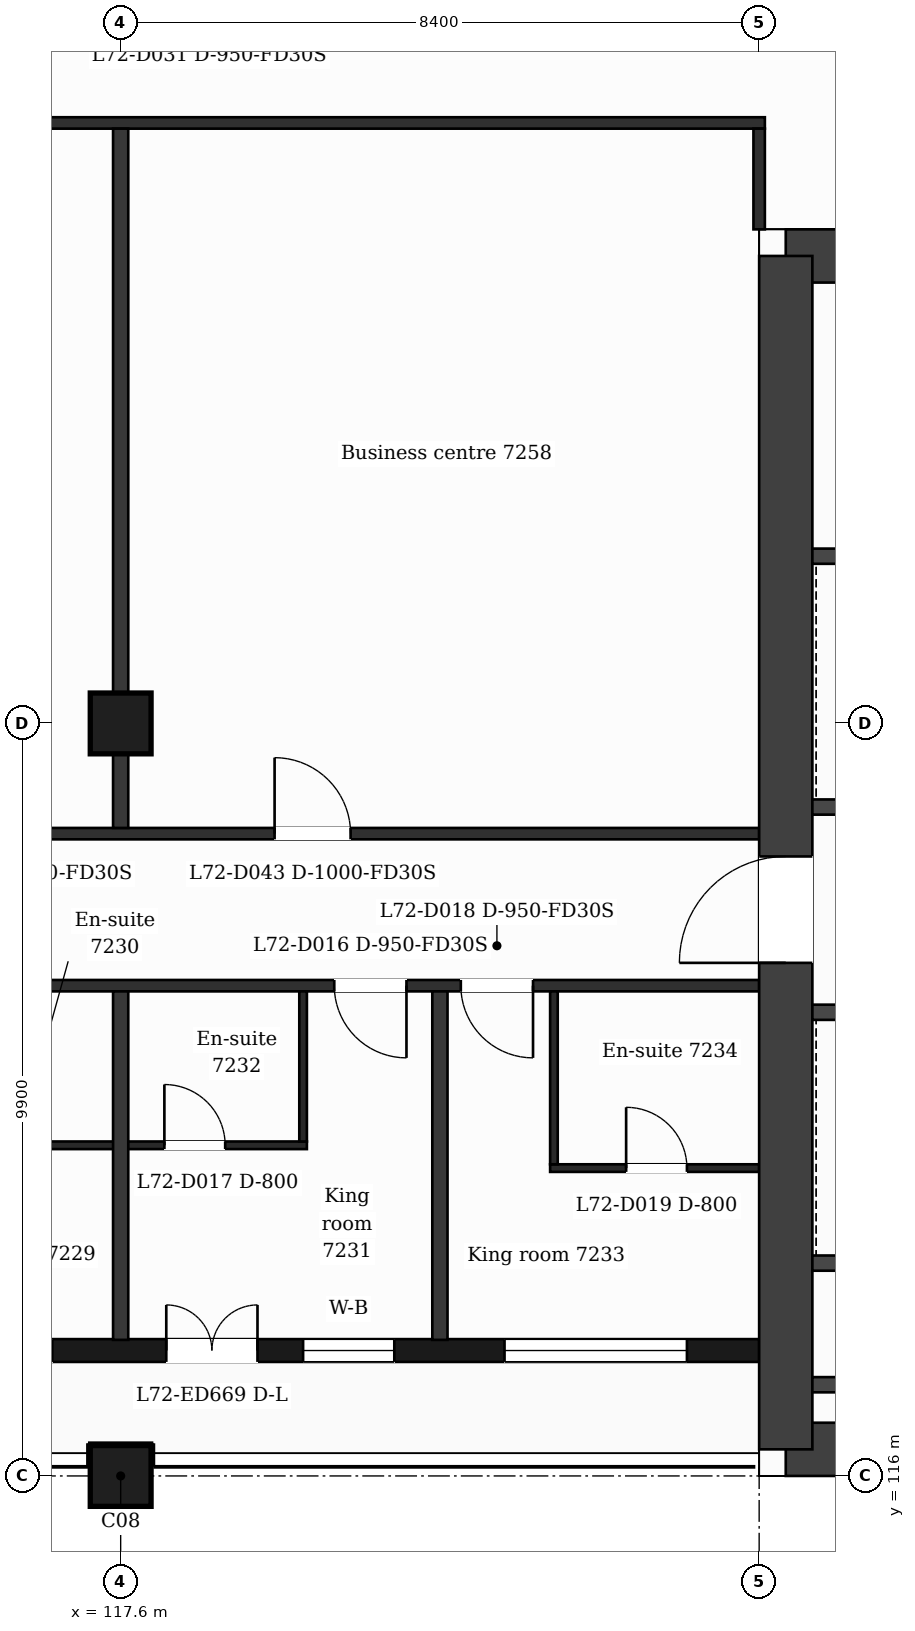
"""IFC4 building model, lengths in metres.
Left out: names, types, materials, properties, quantities, classifications, styles, units other than length and angle.
Written with IfcOpenShell. Run it as: python <this file> out.ifc"""

import sys

from ifc_helpers import new_model, si_unit, direction, frame, frame_2d, origin, origin_2d, place, context, subcontext, project, spatial, rectangle, extrude, element, fill, save


model = new_model("IFC4")
c1 = context("Model", 3, precision=1e-05, world=origin(), true_north=direction((0.0, 1.0)))
c2 = subcontext(c1, "Body", "Model", "MODEL_VIEW")
j1 = project(units=[si_unit("LENGTHUNIT", "METRE"), si_unit("PLANEANGLEUNIT", "RADIAN")], contexts=[c1])
p1 = place(None, origin())
s1 = spatial("IfcSite", under=j1, at=p1, CompositionType="ELEMENT")
p2 = place(p1, origin())
s2 = spatial("IfcBuilding", under=s1, at=p2, CompositionType="ELEMENT")
p3 = place(p2, frame((0.0, 0.0, 296.0)))
s3 = spatial("IfcBuildingStorey", under=s2, at=p3, CompositionType="ELEMENT", Elevation=296.0)
p4 = place(p3, frame((126.35, 132.05, 0.0), z_axis=(0.0, 0.0, 1.0), x_axis=(1.0, 0.0, 0.0)))
e1 = element("IfcWall", 1, at=p4, inside=s3, PredefinedType="SHEAR", context=c2, shape_type="SweptSolid", body=[
    extrude(rectangle(XDim=11.513, YDim=0.7, at=frame_2d((5.757, 0.0))), origin(), (0.0, 0.0, 1.0), 3.7),
])
p5 = place(p4, frame((3.386, 0.0, 0.0)))
e2 = element("IfcOpeningElement", 2, at=p5, cuts=e1, PredefinedType="OPENING", context=c2, shape_type="SweptSolid", body=[
    extrude(rectangle(XDim=1.2, YDim=2.1, at=frame_2d((0.6, 1.05))), frame((0.0, 0.36, 0.0), z_axis=(0.0, -1.0, 0.0), x_axis=(1.0, 0.0, 0.0)), (0.0, 0.0, 1.0), 0.72),
])
p6 = place(p3, frame((139.977, 116.35, 0.0), z_axis=(0.0, 0.0, 1.0), x_axis=(-1.0, 0.0, 0.0)))
e3 = element("IfcWall", 3, at=p6, inside=s3, PredefinedType="SHEAR", context=c2, shape_type="SweptSolid", body=[
    extrude(rectangle(XDim=13.626, YDim=0.7, at=frame_2d((6.813, 0.0))), origin(), (0.0, 0.0, 1.0), 3.7),
])
p7 = place(p3, frame((126.35, 116.35, 0.0), z_axis=(0.0, 0.0, 1.0), x_axis=(0.0, 1.0, 0.0)))
e4 = element("IfcWall", 4, at=p7, inside=s3, PredefinedType="SHEAR", context=c2, shape_type="SweptSolid", body=[
    extrude(rectangle(XDim=15.7, YDim=0.7, at=frame_2d((7.85, 0.0))), origin(), (0.0, 0.0, 1.0), 3.7),
])
p8 = place(p7, frame((6.4, 0.0, 0.0)))
e5 = element("IfcOpeningElement", 5, at=p8, cuts=e4, PredefinedType="OPENING", context=c2, shape_type="SweptSolid", body=[
    extrude(rectangle(XDim=1.4, YDim=2.1, at=frame_2d((0.7, 1.05))), frame((0.0, 0.36, 0.0), z_axis=(0.0, -1.0, 0.0), x_axis=(1.0, 0.0, 0.0)), (0.0, 0.0, 1.0), 0.72),
])
for number, where, z_axis, x_axis in (
    (6, (117.6, 116.0, 0.0), (0.0, 0.0, 1.0), (1.0, 0.0, 0.0)),
    (7, (117.6, 125.9, 0.0), (0.0, 0.0, 1.0), (1.0, 0.0, 0.0)),
):
    element("IfcColumn", number, at=place(p3, frame(where, z_axis=z_axis, x_axis=x_axis)), inside=s3, PredefinedType="COLUMN", context=c2, shape_type="SweptSolid", body=[
        extrude(rectangle(XDim=0.8, YDim=0.8, at=origin_2d()), origin(), (0.0, 0.0, 1.0), 3.7),
    ])
p9 = place(p3, frame((100.8, 117.65, 0.0), z_axis=(0.0, 0.0, 1.0), x_axis=(1.0, 0.0, 0.0)))
e8 = element("IfcWall", 8, at=p9, inside=s3, PredefinedType="SOLIDWALL", context=c2, shape_type="SweptSolid", body=[
    extrude(rectangle(XDim=25.2, YDim=0.3, at=frame_2d((12.6, 0.0))), origin(), (0.0, 0.0, 1.0), 3.38),
])
p10 = place(p9, frame((1.55, 0.0, 0.9)))
e9 = element("IfcOpeningElement", 9, at=p10, cuts=e8, PredefinedType="OPENING", context=c2, shape_type="SweptSolid", body=[
    extrude(rectangle(XDim=1.2, YDim=2.1, at=frame_2d((0.6, 1.05))), frame((0.0, 0.16, 0.0), z_axis=(0.0, -1.0, 0.0), x_axis=(1.0, 0.0, 0.0)), (0.0, 0.0, 1.0), 0.32),
])
p11 = place(p9, frame((5.7, 0.0, 0.9)))
e10 = element("IfcOpeningElement", 10, at=p11, cuts=e8, PredefinedType="OPENING", context=c2, shape_type="SweptSolid", body=[
    extrude(rectangle(XDim=1.2, YDim=2.1, at=frame_2d((0.6, 1.05))), frame((0.0, 0.16, 0.0), z_axis=(0.0, -1.0, 0.0), x_axis=(1.0, 0.0, 0.0)), (0.0, 0.0, 1.0), 0.32),
])
p12 = place(p9, frame((9.0, 0.0, 0.0)))
e11 = element("IfcOpeningElement", 11, at=p12, cuts=e8, PredefinedType="OPENING", context=c2, shape_type="SweptSolid", body=[
    extrude(rectangle(XDim=1.2, YDim=2.4, at=frame_2d((0.6, 1.2))), frame((0.0, 0.16, 0.0), z_axis=(0.0, -1.0, 0.0), x_axis=(1.0, 0.0, 0.0)), (0.0, 0.0, 1.0), 0.32),
])
p13 = place(p9, frame((10.8, 0.0, 0.9)))
e12 = element("IfcOpeningElement", 12, at=p13, cuts=e8, PredefinedType="OPENING", context=c2, shape_type="SweptSolid", body=[
    extrude(rectangle(XDim=1.2, YDim=2.1, at=frame_2d((0.6, 1.05))), frame((0.0, 0.16, 0.0), z_axis=(0.0, -1.0, 0.0), x_axis=(1.0, 0.0, 0.0)), (0.0, 0.0, 1.0), 0.32),
])
p14 = place(p9, frame((13.5, 0.0, 0.9)))
e13 = element("IfcOpeningElement", 13, at=p14, cuts=e8, PredefinedType="OPENING", context=c2, shape_type="SweptSolid", body=[
    extrude(rectangle(XDim=2.4, YDim=2.1, at=frame_2d((1.2, 1.05))), frame((0.0, 0.16, 0.0), z_axis=(0.0, -1.0, 0.0), x_axis=(1.0, 0.0, 0.0)), (0.0, 0.0, 1.0), 0.32),
])
p15 = place(p9, frame((17.4, 0.0, 0.0)))
e14 = element("IfcOpeningElement", 14, at=p15, cuts=e8, PredefinedType="OPENING", context=c2, shape_type="SweptSolid", body=[
    extrude(rectangle(XDim=1.2, YDim=2.4, at=frame_2d((0.6, 1.2))), frame((0.0, 0.16, 0.0), z_axis=(0.0, -1.0, 0.0), x_axis=(1.0, 0.0, 0.0)), (0.0, 0.0, 1.0), 0.32),
])
p16 = place(p9, frame((19.2, 0.0, 0.9)))
e15 = element("IfcOpeningElement", 15, at=p16, cuts=e8, PredefinedType="OPENING", context=c2, shape_type="SweptSolid", body=[
    extrude(rectangle(XDim=1.2, YDim=2.1, at=frame_2d((0.6, 1.05))), frame((0.0, 0.16, 0.0), z_axis=(0.0, -1.0, 0.0), x_axis=(1.0, 0.0, 0.0)), (0.0, 0.0, 1.0), 0.32),
])
p17 = place(p9, frame((21.85, 0.0, 0.9)))
e16 = element("IfcOpeningElement", 16, at=p17, cuts=e8, PredefinedType="OPENING", context=c2, shape_type="SweptSolid", body=[
    extrude(rectangle(XDim=2.4, YDim=2.1, at=frame_2d((1.2, 1.05))), frame((0.0, 0.16, 0.0), z_axis=(0.0, -1.0, 0.0), x_axis=(1.0, 0.0, 0.0)), (0.0, 0.0, 1.0), 0.32),
])
for number, where, z_axis, x_axis in (
    (17, (126.7, 117.2, 0.0), (0.0, 0.0, 1.0), (1.0, 0.0, 0.0)),
    (18, (126.7, 118.8, 0.0), (0.0, 0.0, 1.0), (1.0, 0.0, 0.0)),
):
    element("IfcWall", number, at=place(p3, frame(where, z_axis=z_axis, x_axis=x_axis)), inside=s3, PredefinedType="PARTITIONING", context=c2, shape_type="SweptSolid", body=[
        extrude(rectangle(XDim=4.873, YDim=0.2, at=frame_2d((2.437, 0.0))), origin(), (0.0, 0.0, 1.0), 3.38),
    ])
p18 = place(p3, frame((123.25, 120.05, 0.0), z_axis=(0.0, 0.0, 1.0), x_axis=(1.0, 0.0, 0.0)))
e19 = element("IfcWall", 19, at=p18, inside=s3, PredefinedType="PARTITIONING", context=c2, shape_type="SweptSolid", body=[
    extrude(rectangle(XDim=2.75, YDim=0.1, at=frame_2d((1.375, 0.0))), origin(), (0.0, 0.0, 1.0), 3.38),
])
p19 = place(p18, frame((1.0, 0.0, 0.0)))
e20 = element("IfcOpeningElement", 20, at=p19, cuts=e19, PredefinedType="OPENING", context=c2, shape_type="SweptSolid", body=[
    extrude(rectangle(XDim=0.8, YDim=2.1, at=frame_2d((0.4, 1.05))), frame((0.0, 0.06, 0.0), z_axis=(0.0, -1.0, 0.0), x_axis=(1.0, 0.0, 0.0)), (0.0, 0.0, 1.0), 0.12),
])
p20 = place(p3, frame((115.45, 120.35, 0.0), z_axis=(0.0, 0.0, 1.0), x_axis=(1.0, 0.0, 0.0)))
e21 = element("IfcWall", 21, at=p20, inside=s3, PredefinedType="PARTITIONING", context=c2, shape_type="SweptSolid", body=[
    extrude(rectangle(XDim=4.6, YDim=0.1, at=frame_2d((2.3, 0.0))), origin(), (0.0, 0.0, 1.0), 3.38),
])
p21 = place(p20, frame((2.725, 0.0, 0.0)))
e22 = element("IfcOpeningElement", 22, at=p21, cuts=e21, PredefinedType="OPENING", context=c2, shape_type="SweptSolid", body=[
    extrude(rectangle(XDim=0.8, YDim=2.1, at=frame_2d((0.4, 1.05))), frame((0.0, 0.06, 0.0), z_axis=(0.0, -1.0, 0.0), x_axis=(1.0, 0.0, 0.0)), (0.0, 0.0, 1.0), 0.12),
])
p22 = place(p3, frame((126.7, 122.1, 0.0), z_axis=(0.0, 0.0, 1.0), x_axis=(1.0, 0.0, 0.0)))
e23 = element("IfcWall", 23, at=p22, inside=s3, PredefinedType="PARTITIONING", context=c2, shape_type="SweptSolid", body=[
    extrude(rectangle(XDim=4.873, YDim=0.2, at=frame_2d((2.437, 0.0))), origin(), (0.0, 0.0, 1.0), 3.38),
])
p23 = place(p22, frame((3.264, 0.0, 0.0)))
e24 = element("IfcOpeningElement", 24, at=p23, cuts=e23, PredefinedType="OPENING", context=c2, shape_type="SweptSolid", body=[
    extrude(rectangle(XDim=1.1, YDim=2.1, at=frame_2d((0.55, 1.05))), frame((0.0, 0.11, 0.0), z_axis=(0.0, -1.0, 0.0), x_axis=(1.0, 0.0, 0.0)), (0.0, 0.0, 1.0), 0.22),
])
p24 = place(p22, frame((0.827, 0.0, 0.0)))
e25 = element("IfcOpeningElement", 25, at=p24, cuts=e23, PredefinedType="OPENING", context=c2, shape_type="SweptSolid", body=[
    extrude(rectangle(XDim=1.1, YDim=2.1, at=frame_2d((0.55, 1.05))), frame((0.0, 0.11, 0.0), z_axis=(0.0, -1.0, 0.0), x_axis=(1.0, 0.0, 0.0)), (0.0, 0.0, 1.0), 0.22),
])
p25 = place(p3, frame((100.8, 122.45, 0.0), z_axis=(0.0, 0.0, 1.0), x_axis=(1.0, 0.0, 0.0)))
e26 = element("IfcWall", 26, at=p25, inside=s3, PredefinedType="PARTITIONING", context=c2, shape_type="SweptSolid", body=[
    extrude(rectangle(XDim=25.2, YDim=0.15, at=frame_2d((12.6, 0.0))), origin(), (0.0, 0.0, 1.0), 3.38),
])
p26 = place(p25, frame((1.6, 0.0, 0.0)))
e27 = element("IfcOpeningElement", 27, at=p26, cuts=e26, PredefinedType="OPENING", context=c2, shape_type="SweptSolid", body=[
    extrude(rectangle(XDim=1.0, YDim=2.1, at=frame_2d((0.5, 1.05))), frame((0.0, 0.085, 0.0), z_axis=(0.0, -1.0, 0.0), x_axis=(1.0, 0.0, 0.0)), (0.0, 0.0, 1.0), 0.17),
])
p27 = place(p25, frame((11.12, 0.0, 0.0)))
e28 = element("IfcOpeningElement", 28, at=p27, cuts=e26, PredefinedType="OPENING", context=c2, shape_type="SweptSolid", body=[
    extrude(rectangle(XDim=0.95, YDim=2.1, at=frame_2d((0.475, 1.05))), frame((0.0, 0.085, 0.0), z_axis=(0.0, -1.0, 0.0), x_axis=(1.0, 0.0, 0.0)), (0.0, 0.0, 1.0), 0.17),
])
p28 = place(p25, frame((13.05, 0.0, 0.0)))
e29 = element("IfcOpeningElement", 29, at=p28, cuts=e26, PredefinedType="OPENING", context=c2, shape_type="SweptSolid", body=[
    extrude(rectangle(XDim=1.0, YDim=2.1, at=frame_2d((0.5, 1.05))), frame((0.0, 0.085, 0.0), z_axis=(0.0, -1.0, 0.0), x_axis=(1.0, 0.0, 0.0)), (0.0, 0.0, 1.0), 0.17),
])
p29 = place(p25, frame((19.61, 0.0, 0.0)))
e30 = element("IfcOpeningElement", 30, at=p29, cuts=e26, PredefinedType="OPENING", context=c2, shape_type="SweptSolid", body=[
    extrude(rectangle(XDim=0.95, YDim=2.1, at=frame_2d((0.475, 1.05))), frame((0.0, 0.085, 0.0), z_axis=(0.0, -1.0, 0.0), x_axis=(1.0, 0.0, 0.0)), (0.0, 0.0, 1.0), 0.17),
])
p30 = place(p25, frame((21.275, 0.0, 0.0)))
e31 = element("IfcOpeningElement", 31, at=p30, cuts=e26, PredefinedType="OPENING", context=c2, shape_type="SweptSolid", body=[
    extrude(rectangle(XDim=0.95, YDim=2.1, at=frame_2d((0.475, 1.05))), frame((0.0, 0.085, 0.0), z_axis=(0.0, -1.0, 0.0), x_axis=(1.0, 0.0, 0.0)), (0.0, 0.0, 1.0), 0.17),
])
p31 = place(p3, frame((100.8, 124.45, 0.0), z_axis=(0.0, 0.0, 1.0), x_axis=(1.0, 0.0, 0.0)))
e32 = element("IfcWall", 32, at=p31, inside=s3, PredefinedType="PARTITIONING", context=c2, shape_type="SweptSolid", body=[
    extrude(rectangle(XDim=25.2, YDim=0.15, at=frame_2d((12.6, 0.0))), origin(), (0.0, 0.0, 1.0), 3.38),
])
p32 = place(p31, frame((1.85, 0.0, 0.0)))
e33 = element("IfcOpeningElement", 33, at=p32, cuts=e32, PredefinedType="OPENING", context=c2, shape_type="SweptSolid", body=[
    extrude(rectangle(XDim=1.0, YDim=2.1, at=frame_2d((0.5, 1.05))), frame((0.0, 0.085, 0.0), z_axis=(0.0, -1.0, 0.0), x_axis=(1.0, 0.0, 0.0)), (0.0, 0.0, 1.0), 0.17),
])
p33 = place(p31, frame((6.425, 0.0, 0.0)))
e34 = element("IfcOpeningElement", 34, at=p33, cuts=e32, PredefinedType="OPENING", context=c2, shape_type="SweptSolid", body=[
    extrude(rectangle(XDim=1.0, YDim=2.1, at=frame_2d((0.5, 1.05))), frame((0.0, 0.085, 0.0), z_axis=(0.0, -1.0, 0.0), x_axis=(1.0, 0.0, 0.0)), (0.0, 0.0, 1.0), 0.17),
])
p34 = place(p31, frame((9.4, 0.0, 0.0)))
e35 = element("IfcOpeningElement", 35, at=p34, cuts=e32, PredefinedType="OPENING", context=c2, shape_type="SweptSolid", body=[
    extrude(rectangle(XDim=1.0, YDim=2.1, at=frame_2d((0.5, 1.05))), frame((0.0, 0.085, 0.0), z_axis=(0.0, -1.0, 0.0), x_axis=(1.0, 0.0, 0.0)), (0.0, 0.0, 1.0), 0.17),
])
p35 = place(p31, frame((14.825, 0.0, 0.0)))
e36 = element("IfcOpeningElement", 36, at=p35, cuts=e32, PredefinedType="OPENING", context=c2, shape_type="SweptSolid", body=[
    extrude(rectangle(XDim=1.0, YDim=2.1, at=frame_2d((0.5, 1.05))), frame((0.0, 0.085, 0.0), z_axis=(0.0, -1.0, 0.0), x_axis=(1.0, 0.0, 0.0)), (0.0, 0.0, 1.0), 0.17),
])
p36 = place(p31, frame((18.825, 0.0, 0.0)))
e37 = element("IfcOpeningElement", 37, at=p36, cuts=e32, PredefinedType="OPENING", context=c2, shape_type="SweptSolid", body=[
    extrude(rectangle(XDim=1.0, YDim=2.1, at=frame_2d((0.5, 1.05))), frame((0.0, 0.085, 0.0), z_axis=(0.0, -1.0, 0.0), x_axis=(1.0, 0.0, 0.0)), (0.0, 0.0, 1.0), 0.17),
])
p37 = place(p3, frame((126.7, 124.8, 0.0), z_axis=(0.0, 0.0, 1.0), x_axis=(1.0, 0.0, 0.0)))
e38 = element("IfcWall", 38, at=p37, inside=s3, PredefinedType="PARTITIONING", context=c2, shape_type="SweptSolid", body=[
    extrude(rectangle(XDim=4.849, YDim=0.2, at=frame_2d((2.424, 0.0))), origin(), (0.0, 0.0, 1.0), 3.38),
])
p38 = place(p37, frame((0.818, 0.0, 0.0)))
e39 = element("IfcOpeningElement", 39, at=p38, cuts=e38, PredefinedType="OPENING", context=c2, shape_type="SweptSolid", body=[
    extrude(rectangle(XDim=1.1, YDim=2.1, at=frame_2d((0.55, 1.05))), frame((0.0, 0.11, 0.0), z_axis=(0.0, -1.0, 0.0), x_axis=(1.0, 0.0, 0.0)), (0.0, 0.0, 1.0), 0.22),
])
p39 = place(p3, frame((126.7, 128.1, 0.0), z_axis=(0.0, 0.0, 1.0), x_axis=(1.0, 0.0, 0.0)))
e40 = element("IfcWall", 40, at=p39, inside=s3, PredefinedType="PARTITIONING", context=c2, shape_type="SweptSolid", body=[
    extrude(rectangle(XDim=4.849, YDim=0.2, at=frame_2d((2.424, 0.0))), origin(), (0.0, 0.0, 1.0), 3.38),
])
p40 = place(p39, frame((3.149, 0.0, 0.0)))
e41 = element("IfcOpeningElement", 41, at=p40, cuts=e40, PredefinedType="OPENING", context=c2, shape_type="SweptSolid", body=[
    extrude(rectangle(XDim=1.1, YDim=2.1, at=frame_2d((0.55, 1.05))), frame((0.0, 0.11, 0.0), z_axis=(0.0, -1.0, 0.0), x_axis=(1.0, 0.0, 0.0)), (0.0, 0.0, 1.0), 0.22),
])
p41 = place(p3, frame((100.725, 133.8, 0.0), z_axis=(0.0, 0.0, 1.0), x_axis=(1.0, 0.0, 0.0)))
e42 = element("IfcWall", 42, at=p41, inside=s3, PredefinedType="PARTITIONING", context=c2, shape_type="SweptSolid", body=[
    extrude(rectangle(XDim=25.35, YDim=0.15, at=frame_2d((12.675, 0.0))), origin(), (0.0, 0.0, 1.0), 3.38),
])
p42 = place(p41, frame((9.825, 0.0, 0.0)))
e43 = element("IfcOpeningElement", 43, at=p42, cuts=e42, PredefinedType="OPENING", context=c2, shape_type="SweptSolid", body=[
    extrude(rectangle(XDim=1.0, YDim=2.1, at=frame_2d((0.5, 1.05))), frame((0.0, 0.085, 0.0), z_axis=(0.0, -1.0, 0.0), x_axis=(1.0, 0.0, 0.0)), (0.0, 0.0, 1.0), 0.17),
])
p43 = place(p3, frame((117.6, 117.79, 0.0), z_axis=(0.0, 0.0, 1.0), x_axis=(0.0, 1.0, 0.0)))
e44 = element("IfcWall", 44, at=p43, inside=s3, PredefinedType="PARTITIONING", context=c2, shape_type="SweptSolid", body=[
    extrude(rectangle(XDim=4.585, YDim=0.2, at=frame_2d((2.292, 0.0))), origin(), (0.0, 0.0, 1.0), 3.38),
])
p44 = place(p3, frame((117.6, 124.525, 0.0), z_axis=(0.0, 0.0, 1.0), x_axis=(0.0, 1.0, 0.0)))
e45 = element("IfcWall", 45, at=p44, inside=s3, PredefinedType="PARTITIONING", context=c2, shape_type="SweptSolid", body=[
    extrude(rectangle(XDim=9.2, YDim=0.2, at=frame_2d((4.6, 0.0))), origin(), (0.0, 0.0, 1.0), 3.38),
])
p45 = place(p3, frame((120.0, 120.4, 0.0), z_axis=(0.0, 0.0, 1.0), x_axis=(0.0, 1.0, 0.0)))
e46 = element("IfcWall", 46, at=p45, inside=s3, PredefinedType="PARTITIONING", context=c2, shape_type="SweptSolid", body=[
    extrude(rectangle(XDim=1.975, YDim=0.1, at=frame_2d((0.988, 0.0))), origin(), (0.0, 0.0, 1.0), 3.38),
])
p46 = place(p3, frame((121.8, 117.79, 0.0), z_axis=(0.0, 0.0, 1.0), x_axis=(0.0, 1.0, 0.0)))
e47 = element("IfcWall", 47, at=p46, inside=s3, PredefinedType="PARTITIONING", context=c2, shape_type="SweptSolid", body=[
    extrude(rectangle(XDim=4.585, YDim=0.2, at=frame_2d((2.292, 0.0))), origin(), (0.0, 0.0, 1.0), 3.38),
])
p47 = place(p3, frame((123.3, 120.1, 0.0), z_axis=(0.0, 0.0, 1.0), x_axis=(0.0, 1.0, 0.0)))
e48 = element("IfcWall", 48, at=p47, inside=s3, PredefinedType="PARTITIONING", context=c2, shape_type="SweptSolid", body=[
    extrude(rectangle(XDim=2.275, YDim=0.1, at=frame_2d((1.137, 0.0))), origin(), (0.0, 0.0, 1.0), 3.38),
])
p48 = place(p3, frame((126.0, 132.4, 0.0), z_axis=(0.0, 0.0, 1.0), x_axis=(0.0, 1.0, 0.0)))
e49 = element("IfcWall", 49, at=p48, inside=s3, PredefinedType="PARTITIONING", context=c2, shape_type="SweptSolid", body=[
    extrude(rectangle(XDim=1.325, YDim=0.15, at=frame_2d((0.663, 0.0))), origin(), (0.0, 0.0, 1.0), 3.38),
])
p49 = place(p15, origin())
e50 = element("IfcDoor", 50, at=p49, inside=s3, OperationType="DOUBLE_DOOR_SINGLE_SWING", PredefinedType="DOOR", context=c2, shape_type="SweptSolid", body=[
    extrude(rectangle(XDim=1.2, YDim=2.4, at=frame_2d((0.6, 1.2))), frame((0.0, 0.025, 0.0), z_axis=(0.0, -1.0, 0.0), x_axis=(1.0, 0.0, 0.0)), (0.0, 0.0, 1.0), 0.05),
])
fill(e14, e50)
p50 = place(p16, origin())
e51 = element("IfcWindow", 51, at=p50, inside=s3, PartitioningType="SINGLE_PANEL", PredefinedType="WINDOW", context=c2, shape_type="SweptSolid", body=[
    extrude(rectangle(XDim=1.2, YDim=2.1, at=frame_2d((0.6, 1.05))), frame((0.0, 0.03, 0.0), z_axis=(0.0, -1.0, 0.0), x_axis=(1.0, 0.0, 0.0)), (0.0, 0.0, 1.0), 0.06),
])
fill(e15, e51)
p51 = place(p17, origin())
e52 = element("IfcWindow", 52, at=p51, inside=s3, PartitioningType="SINGLE_PANEL", PredefinedType="WINDOW", context=c2, shape_type="SweptSolid", body=[
    extrude(rectangle(XDim=2.4, YDim=2.1, at=frame_2d((1.2, 1.05))), frame((0.0, 0.03, 0.0), z_axis=(0.0, -1.0, 0.0), x_axis=(1.0, 0.0, 0.0)), (0.0, 0.0, 1.0), 0.06),
])
fill(e16, e52)
p52 = place(p29, origin())
e53 = element("IfcDoor", 53, at=p52, inside=s3, OperationType="SINGLE_SWING_RIGHT", PredefinedType="DOOR", context=c2, shape_type="SweptSolid", body=[
    extrude(rectangle(XDim=0.95, YDim=2.1, at=frame_2d((0.475, 1.05))), frame((0.0, 0.025, 0.0), z_axis=(0.0, -1.0, 0.0), x_axis=(1.0, 0.0, 0.0)), (0.0, 0.0, 1.0), 0.05),
])
fill(e30, e53)
p53 = place(p21, origin())
e54 = element("IfcDoor", 54, at=p53, inside=s3, OperationType="SINGLE_SWING_LEFT", PredefinedType="DOOR", context=c2, shape_type="SweptSolid", body=[
    extrude(rectangle(XDim=0.8, YDim=2.1, at=frame_2d((0.4, 1.05))), frame((0.0, 0.025, 0.0), z_axis=(0.0, -1.0, 0.0), x_axis=(1.0, 0.0, 0.0)), (0.0, 0.0, 1.0), 0.05),
])
fill(e22, e54)
p54 = place(p30, origin())
e55 = element("IfcDoor", 55, at=p54, inside=s3, OperationType="SINGLE_SWING_RIGHT", PredefinedType="DOOR", context=c2, shape_type="SweptSolid", body=[
    extrude(rectangle(XDim=0.95, YDim=2.1, at=frame_2d((0.475, 1.05))), frame((0.0, 0.025, 0.0), z_axis=(0.0, -1.0, 0.0), x_axis=(1.0, 0.0, 0.0)), (0.0, 0.0, 1.0), 0.05),
])
fill(e31, e55)
p55 = place(p19, origin())
e56 = element("IfcDoor", 56, at=p55, inside=s3, OperationType="SINGLE_SWING_LEFT", PredefinedType="DOOR", context=c2, shape_type="SweptSolid", body=[
    extrude(rectangle(XDim=0.8, YDim=2.1, at=frame_2d((0.4, 1.05))), frame((0.0, 0.025, 0.0), z_axis=(0.0, -1.0, 0.0), x_axis=(1.0, 0.0, 0.0)), (0.0, 0.0, 1.0), 0.05),
])
fill(e20, e56)
p56 = place(p36, origin())
e57 = element("IfcDoor", 57, at=p56, inside=s3, OperationType="SINGLE_SWING_LEFT", PredefinedType="DOOR", context=c2, shape_type="SweptSolid", body=[
    extrude(rectangle(XDim=1.0, YDim=2.1, at=frame_2d((0.5, 1.05))), frame((0.0, 0.025, 0.0), z_axis=(0.0, -1.0, 0.0), x_axis=(1.0, 0.0, 0.0)), (0.0, 0.0, 1.0), 0.05),
])
fill(e37, e57)
p57 = place(p8, origin())
e58 = element("IfcDoor", 58, at=p57, inside=s3, OperationType="SINGLE_SWING_LEFT", PredefinedType="DOOR", context=c2, shape_type="SweptSolid", body=[
    extrude(rectangle(XDim=1.4, YDim=2.1, at=frame_2d((0.7, 1.05))), frame((0.0, 0.025, 0.0), z_axis=(0.0, -1.0, 0.0), x_axis=(1.0, 0.0, 0.0)), (0.0, 0.0, 1.0), 0.05),
])
fill(e5, e58)
save(model, sys.argv[1])
